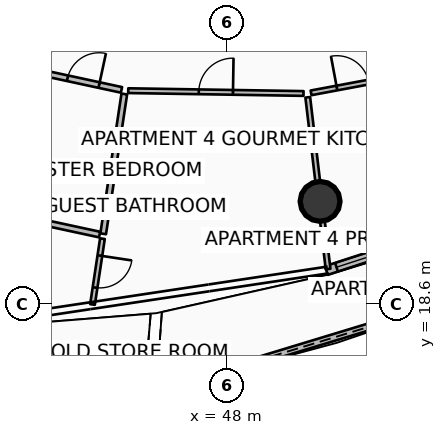
"""IFC4 building model, lengths in metres.
Left out: names, types, materials, properties, quantities, classifications, styles, units other than length and angle.
Written with IfcOpenShell. Run it as: python <this file> out.ifc"""

import sys

from ifc_helpers import new_model, si_unit, direction, frame, frame_2d, origin, origin_2d, place, context, subcontext, project, spatial, polyline, rectangle, circle, outline, extrude, element, fill, save


model = new_model("IFC4")
c1 = context("Model", 3, precision=1e-05, world=origin(), true_north=direction((0.0, 1.0)))
c2 = subcontext(c1, "Body", "Model", "MODEL_VIEW")
j1 = project(units=[si_unit("LENGTHUNIT", "METRE"), si_unit("PLANEANGLEUNIT", "RADIAN")], contexts=[c1])
p1 = place(None, origin())
s1 = spatial("IfcSite", under=j1, at=p1, CompositionType="ELEMENT")
p2 = place(p1, origin())
s2 = spatial("IfcBuilding", under=s1, at=p2, CompositionType="ELEMENT")
p3 = place(p2, frame((0.0, 0.0, 180.3)))
s3 = spatial("IfcBuildingStorey", under=s2, at=p3, CompositionType="ELEMENT", Elevation=180.3)
p4 = place(p3, frame((50.45, 21.3, 0.0), z_axis=(0.0, 0.0, 1.0), x_axis=(1.0, 0.0, 0.0)))
e1 = element("IfcColumn", 1, at=p4, inside=s3, PredefinedType="COLUMN", context=c2, shape_type="SweptSolid", body=[
    extrude(circle(Radius=0.525, at=origin_2d()), origin(), (0.0, 0.0, 1.0), 3.5),
])
p5 = place(p3, frame((46.135, 16.298, 0.0), z_axis=(0.0, 0.0, 1.0), x_axis=(0.956822857871, 0.290671668135, 0.0)))
e2 = element("IfcWall", 2, at=p5, inside=s3, PredefinedType="PARAPET", context=c2, shape_type="SweptSolid", body=[
    extrude(outline(polyline([(0.0, 0.0), (9.598, 0.0), (9.598, 1.148), (4.799, 1.284), (0.0, 1.483), (0.0, 0.0)])), frame((0.0, 0.09, 0.0), z_axis=(0.0, -1.0, 0.0), x_axis=(1.0, 0.0, 0.0)), (0.0, 0.0, 1.0), 0.18),
])
p6 = place(p3, frame((50.616, 19.481, 0.0), z_axis=(0.0, 0.0, 1.0), x_axis=(0.951058543936, 0.309010753869, 0.0)))
e3 = element("IfcWall", 3, at=p6, inside=s3, PredefinedType="SOLIDWALL", context=c2, shape_type="SweptSolid", body=[
    extrude(rectangle(XDim=8.942, YDim=0.24, at=frame_2d((4.471, 0.0))), origin(), (0.0, 0.0, 1.0), 2.45),
])
p7 = place(p6, frame((6.722, 0.0, 0.0)))
e4 = element("IfcOpeningElement", 4, at=p7, cuts=e3, PredefinedType="OPENING", context=c2, shape_type="SweptSolid", body=[
    extrude(rectangle(XDim=1.45, YDim=2.15, at=frame_2d((0.725, 1.075))), frame((0.0, 0.13, 0.0), z_axis=(0.0, -1.0, 0.0), x_axis=(1.0, 0.0, 0.0)), (0.0, 0.0, 1.0), 0.26),
])
p8 = place(p6, frame((0.28, 0.0, 0.65)))
e5 = element("IfcOpeningElement", 5, at=p8, cuts=e3, PredefinedType="OPENING", context=c2, shape_type="SweptSolid", body=[
    extrude(rectangle(XDim=1.6, YDim=1.5, at=frame_2d((0.8, 0.75))), frame((0.0, 0.13, 0.0), z_axis=(0.0, -1.0, 0.0), x_axis=(1.0, 0.0, 0.0)), (0.0, 0.0, 1.0), 0.26),
])
p9 = place(p3, frame((45.531, 33.244, 0.0), z_axis=(0.0, 0.0, 1.0), x_axis=(-0.271437162306, -0.962456163635, 0.0)))
e6 = element("IfcWall", 6, at=p9, inside=s3, PredefinedType="PARTITIONING", context=c2, shape_type="SweptSolid", body=[
    extrude(rectangle(XDim=15.63, YDim=0.18, at=frame_2d((7.815, 0.0))), origin(), (0.0, 0.0, 1.0), 2.94),
])
p10 = place(p3, frame((43.215, 24.667, 0.0), z_axis=(0.0, 0.0, 1.0), x_axis=(0.977507597701, -0.210900204925, 0.0)))
e7 = element("IfcWall", 7, at=p10, inside=s3, PredefinedType="PARTITIONING", context=c2, shape_type="SweptSolid", body=[
    extrude(rectangle(XDim=2.055, YDim=0.15, at=frame_2d((1.027, 0.0))), origin(), (0.0, 0.0, 1.0), 2.94),
])
p11 = place(p10, frame((0.602, 0.0, 0.0)))
e8 = element("IfcOpeningElement", 8, at=p11, cuts=e7, PredefinedType="OPENING", context=c2, shape_type="SweptSolid", body=[
    extrude(rectangle(XDim=0.85, YDim=2.06, at=frame_2d((0.425, 1.03))), frame((0.0, 0.085, 0.0), z_axis=(0.0, -1.0, 0.0), x_axis=(1.0, 0.0, 0.0)), (0.0, 0.0, 1.0), 0.17),
])
p12 = place(p3, frame((42.17, 20.962, 0.0), z_axis=(0.0, 0.0, 1.0), x_axis=(0.977505473959, -0.210910048076, 0.0)))
e9 = element("IfcWall", 9, at=p12, inside=s3, PredefinedType="PARTITIONING", context=c2, shape_type="SweptSolid", body=[
    extrude(rectangle(XDim=2.535, YDim=0.15, at=frame_2d((1.268, 0.0))), origin(), (0.0, 0.0, 1.0), 2.94),
])
p13 = place(p3, frame((45.298, 24.126, 0.0), z_axis=(0.0, 0.0, 1.0), x_axis=(-0.149437927454, -0.988771108922, 0.0)))
e10 = element("IfcWall", 10, at=p13, inside=s3, PredefinedType="PARTITIONING", context=c2, shape_type="SweptSolid", body=[
    extrude(rectangle(XDim=3.72, YDim=0.15, at=frame_2d((1.86, 0.0))), origin(), (0.0, 0.0, 1.0), 2.94),
])
p14 = place(p3, frame((44.723, 20.319, 0.0), z_axis=(0.0, 0.0, 1.0), x_axis=(-0.14945844671, -0.988768007526, 0.0)))
e11 = element("IfcWall", 11, at=p14, inside=s3, PredefinedType="PARTITIONING", context=c2, shape_type="SweptSolid", body=[
    extrude(rectangle(XDim=1.751, YDim=0.125, at=frame_2d((0.875, 0.0))), origin(), (0.0, 0.0, 1.0), 2.94),
])
p15 = place(p14, frame((0.451, 0.0, 0.0)))
e12 = element("IfcOpeningElement", 12, at=p15, cuts=e11, PredefinedType="OPENING", context=c2, shape_type="SweptSolid", body=[
    extrude(rectangle(XDim=0.85, YDim=2.06, at=frame_2d((0.425, 1.03))), frame((0.0, 0.073, 0.0), z_axis=(0.0, -1.0, 0.0), x_axis=(1.0, 0.0, 0.0)), (0.0, 0.0, 1.0), 0.145),
])
p16 = place(p3, frame((45.402, 24.214, 0.0), z_axis=(0.0, 0.0, 1.0), x_axis=(0.999870557478, -0.016089384368, 0.0)))
e13 = element("IfcWall", 13, at=p16, inside=s3, PredefinedType="PARTITIONING", context=c2, shape_type="SweptSolid", body=[
    extrude(rectangle(XDim=4.613, YDim=0.125, at=frame_2d((2.306, 0.0))), origin(), (0.0, 0.0, 1.0), 2.94),
])
p17 = place(p16, frame((1.856, 0.0, 0.0)))
e14 = element("IfcOpeningElement", 14, at=p17, cuts=e13, PredefinedType="OPENING", context=c2, shape_type="SweptSolid", body=[
    extrude(rectangle(XDim=0.9, YDim=2.08, at=frame_2d((0.45, 1.04))), frame((0.0, 0.073, 0.0), z_axis=(0.0, -1.0, 0.0), x_axis=(1.0, 0.0, 0.0)), (0.0, 0.0, 1.0), 0.145),
])
p18 = place(p3, frame((50.126, 24.038, 0.0), z_axis=(0.0, 0.0, 1.0), x_axis=(0.117498349672, -0.993073077787, 0.0)))
e15 = element("IfcWall", 15, at=p18, inside=s3, PredefinedType="PARTITIONING", context=c2, shape_type="SweptSolid", body=[
    extrude(rectangle(XDim=4.548, YDim=0.125, at=frame_2d((2.274, 0.0))), origin(), (0.0, 0.0, 1.0), 2.94),
])
p19 = place(p3, frame((50.212, 24.156, 0.0), z_axis=(0.0, 0.0, 1.0), x_axis=(0.982938932549, 0.183932201855, 0.0)))
e16 = element("IfcWall", 16, at=p19, inside=s3, PredefinedType="PARTITIONING", context=c2, shape_type="SweptSolid", body=[
    extrude(rectangle(XDim=2.234, YDim=0.125, at=frame_2d((1.117, 0.0))), origin(), (0.0, 0.0, 1.0), 2.94),
])
p20 = place(p19, frame((0.692, 0.0, 0.0)))
e17 = element("IfcOpeningElement", 17, at=p20, cuts=e16, PredefinedType="OPENING", context=c2, shape_type="SweptSolid", body=[
    extrude(rectangle(XDim=0.85, YDim=2.06, at=frame_2d((0.425, 1.03))), frame((0.0, 0.073, 0.0), z_axis=(0.0, -1.0, 0.0), x_axis=(1.0, 0.0, 0.0)), (0.0, 0.0, 1.0), 0.145),
])
p21 = place(p8, origin())
e18 = element("IfcWindow", 18, at=p21, inside=s3, PartitioningType="SINGLE_PANEL", PredefinedType="WINDOW", context=c2, shape_type="SweptSolid", body=[
    extrude(rectangle(XDim=1.6, YDim=1.5, at=frame_2d((0.8, 0.75))), frame((0.0, 0.03, 0.0), z_axis=(0.0, -1.0, 0.0), x_axis=(1.0, 0.0, 0.0)), (0.0, 0.0, 1.0), 0.06),
])
fill(e5, e18)
p22 = place(p11, origin())
e19 = element("IfcDoor", 19, at=p22, inside=s3, OperationType="SINGLE_SWING_RIGHT", PredefinedType="DOOR", context=c2, shape_type="SweptSolid", body=[
    extrude(rectangle(XDim=0.85, YDim=2.06, at=frame_2d((0.425, 1.03))), frame((0.0, 0.025, 0.0), z_axis=(0.0, -1.0, 0.0), x_axis=(1.0, 0.0, 0.0)), (0.0, 0.0, 1.0), 0.05),
])
fill(e8, e19)
p23 = place(p15, origin())
e20 = element("IfcDoor", 20, at=p23, inside=s3, OperationType="SINGLE_SWING_LEFT", PredefinedType="DOOR", context=c2, shape_type="SweptSolid", body=[
    extrude(rectangle(XDim=0.85, YDim=2.06, at=frame_2d((0.425, 1.03))), frame((0.0, 0.025, 0.0), z_axis=(0.0, -1.0, 0.0), x_axis=(1.0, 0.0, 0.0)), (0.0, 0.0, 1.0), 0.05),
])
fill(e12, e20)
p24 = place(p17, origin())
e21 = element("IfcDoor", 21, at=p24, inside=s3, OperationType="SINGLE_SWING_RIGHT", PredefinedType="DOOR", context=c2, shape_type="SweptSolid", body=[
    extrude(rectangle(XDim=0.9, YDim=2.08, at=frame_2d((0.45, 1.04))), frame((0.0, 0.025, 0.0), z_axis=(0.0, -1.0, 0.0), x_axis=(1.0, 0.0, 0.0)), (0.0, 0.0, 1.0), 0.05),
])
fill(e14, e21)
p25 = place(p20, origin())
e22 = element("IfcDoor", 22, at=p25, inside=s3, OperationType="SINGLE_SWING_LEFT", PredefinedType="DOOR", context=c2, shape_type="SweptSolid", body=[
    extrude(rectangle(XDim=0.85, YDim=2.06, at=frame_2d((0.425, 1.03))), frame((0.0, 0.025, 0.0), z_axis=(0.0, -1.0, 0.0), x_axis=(1.0, 0.0, 0.0)), (0.0, 0.0, 1.0), 0.05),
])
fill(e17, e22)
save(model, sys.argv[1])
